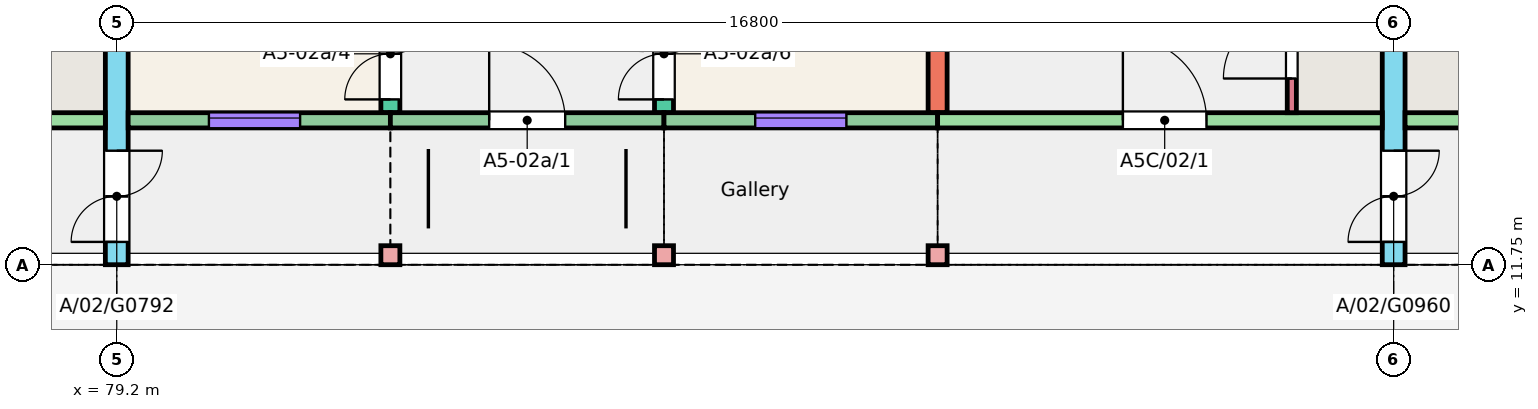
"""IFC4 building model, lengths in metres.
Left out: names, types, materials, properties, quantities, classifications, styles, units other than length and angle.
Written with IfcOpenShell. Run it as: python <this file> out.ifc"""

import sys

from ifc_helpers import new_model, si_unit, direction, frame, frame_2d, origin, origin_2d, place, context, subcontext, project, spatial, rectangle, extrude, element, fill, save


model = new_model("IFC4")
c1 = context("Model", 3, precision=1e-05, world=origin(), true_north=direction((0.0, 1.0)))
c2 = subcontext(c1, "Body", "Model", "MODEL_VIEW")
j1 = project(units=[si_unit("LENGTHUNIT", "METRE"), si_unit("PLANEANGLEUNIT", "RADIAN")], contexts=[c1])
p1 = place(None, origin())
s1 = spatial("IfcSite", under=j1, at=p1, CompositionType="ELEMENT")
p2 = place(p1, origin())
s2 = spatial("IfcBuilding", under=s1, at=p2, CompositionType="ELEMENT")
p3 = place(p2, frame((0.0, 0.0, 6.0)))
s3 = spatial("IfcBuildingStorey", under=s2, at=p3, CompositionType="ELEMENT", Elevation=6.0)
p4 = place(p3, frame((79.2, 11.75, 0.0), z_axis=(0.0, 0.0, 1.0), x_axis=(0.0, 1.0, 0.0)))
e1 = element("IfcWall", 1, at=p4, inside=s3, PredefinedType="SHEAR", context=c2, shape_type="SweptSolid", body=[
    extrude(rectangle(XDim=11.0, YDim=0.3, at=frame_2d((5.5, 0.0))), origin(), (0.0, 0.0, 1.0), 3.0),
])
p5 = place(p4, frame((0.3, 0.0, 0.0)))
e2 = element("IfcOpeningElement", 2, at=p5, cuts=e1, PredefinedType="OPENING", context=c2, shape_type="SweptSolid", body=[
    extrude(rectangle(XDim=1.2, YDim=2.1, at=frame_2d((0.6, 1.05))), frame((0.0, 0.16, 0.0), z_axis=(0.0, -1.0, 0.0), x_axis=(1.0, 0.0, 0.0)), (0.0, 0.0, 1.0), 0.32),
])
p6 = place(p3, frame((82.8, 13.75, 0.0), z_axis=(0.0, 0.0, 1.0), x_axis=(0.0, 1.0, 0.0)))
e3 = element("IfcWall", 3, at=p6, inside=s3, PredefinedType="SHEAR", context=c2, shape_type="SweptSolid", body=[
    extrude(rectangle(XDim=9.0, YDim=0.25, at=frame_2d((4.5, 0.0))), origin(), (0.0, 0.0, 1.0), 3.0),
])
p7 = place(p6, frame((0.175, 0.0, 0.0)))
e4 = element("IfcOpeningElement", 4, at=p7, cuts=e3, PredefinedType="OPENING", context=c2, shape_type="SweptSolid", body=[
    extrude(rectangle(XDim=1.2, YDim=2.1, at=frame_2d((0.6, 1.05))), frame((0.0, 0.135, 0.0), z_axis=(0.0, -1.0, 0.0), x_axis=(1.0, 0.0, 0.0)), (0.0, 0.0, 1.0), 0.27),
])
p8 = place(p6, frame((6.4, 0.0, 0.0)))
e5 = element("IfcOpeningElement", 5, at=p8, cuts=e3, PredefinedType="OPENING", context=c2, shape_type="SweptSolid", body=[
    extrude(rectangle(XDim=1.2, YDim=2.1, at=frame_2d((0.6, 1.05))), frame((0.0, 0.135, 0.0), z_axis=(0.0, -1.0, 0.0), x_axis=(1.0, 0.0, 0.0)), (0.0, 0.0, 1.0), 0.27),
])
p9 = place(p3, frame((86.4, 13.75, 0.0), z_axis=(0.0, 0.0, 1.0), x_axis=(0.0, 1.0, 0.0)))
e6 = element("IfcWall", 6, at=p9, inside=s3, PredefinedType="SHEAR", context=c2, shape_type="SweptSolid", body=[
    extrude(rectangle(XDim=9.0, YDim=0.25, at=frame_2d((4.5, 0.0))), origin(), (0.0, 0.0, 1.0), 3.0),
])
p10 = place(p9, frame((0.175, 0.0, 0.0)))
e7 = element("IfcOpeningElement", 7, at=p10, cuts=e6, PredefinedType="OPENING", context=c2, shape_type="SweptSolid", body=[
    extrude(rectangle(XDim=1.2, YDim=2.1, at=frame_2d((0.6, 1.05))), frame((0.0, 0.135, 0.0), z_axis=(0.0, -1.0, 0.0), x_axis=(1.0, 0.0, 0.0)), (0.0, 0.0, 1.0), 0.27),
])
p11 = place(p9, frame((6.4, 0.0, 0.0)))
e8 = element("IfcOpeningElement", 8, at=p11, cuts=e6, PredefinedType="OPENING", context=c2, shape_type="SweptSolid", body=[
    extrude(rectangle(XDim=1.2, YDim=2.1, at=frame_2d((0.6, 1.05))), frame((0.0, 0.135, 0.0), z_axis=(0.0, -1.0, 0.0), x_axis=(1.0, 0.0, 0.0)), (0.0, 0.0, 1.0), 0.27),
])
p12 = place(p3, frame((90.0, 13.75, 0.0), z_axis=(0.0, 0.0, 1.0), x_axis=(0.0, 1.0, 0.0)))
e9 = element("IfcWall", 9, at=p12, inside=s3, PredefinedType="SHEAR", context=c2, shape_type="SweptSolid", body=[
    extrude(rectangle(XDim=9.0, YDim=0.25, at=frame_2d((4.5, 0.0))), origin(), (0.0, 0.0, 1.0), 3.0),
])
p13 = place(p3, frame((96.0, 11.75, 0.0), z_axis=(0.0, 0.0, 1.0), x_axis=(0.0, 1.0, 0.0)))
e10 = element("IfcWall", 10, at=p13, inside=s3, PredefinedType="SHEAR", context=c2, shape_type="SweptSolid", body=[
    extrude(rectangle(XDim=11.0, YDim=0.3, at=frame_2d((5.5, 0.0))), origin(), (0.0, 0.0, 1.0), 3.0),
])
p14 = place(p13, frame((0.3, 0.0, 0.0)))
e11 = element("IfcOpeningElement", 11, at=p14, cuts=e10, PredefinedType="OPENING", context=c2, shape_type="SweptSolid", body=[
    extrude(rectangle(XDim=1.2, YDim=2.1, at=frame_2d((0.6, 1.05))), frame((0.0, 0.16, 0.0), z_axis=(0.0, -1.0, 0.0), x_axis=(1.0, 0.0, 0.0)), (0.0, 0.0, 1.0), 0.32),
])
p15 = place(p3, frame((73.2, 13.65, 0.0), z_axis=(0.0, 0.0, 1.0), x_axis=(1.0, 0.0, 0.0)))
e12 = element("IfcWall", 12, at=p15, inside=s3, PredefinedType="SHEAR", context=c2, shape_type="SweptSolid", body=[
    extrude(rectangle(XDim=5.85, YDim=0.2, at=frame_2d((2.925, 0.0))), origin(), (0.0, 0.0, 1.0), 3.0),
])
p16 = place(p15, frame((2.438, 0.0, 0.0)))
e13 = element("IfcOpeningElement", 13, at=p16, cuts=e12, PredefinedType="OPENING", context=c2, shape_type="SweptSolid", body=[
    extrude(rectangle(XDim=1.1, YDim=2.1, at=frame_2d((0.55, 1.05))), frame((0.0, 0.11, 0.0), z_axis=(0.0, -1.0, 0.0), x_axis=(1.0, 0.0, 0.0)), (0.0, 0.0, 1.0), 0.22),
])
p17 = place(p3, frame((79.35, 13.65, 0.0), z_axis=(0.0, 0.0, 1.0), x_axis=(1.0, 0.0, 0.0)))
e14 = element("IfcWall", 14, at=p17, inside=s3, PredefinedType="SOLIDWALL", context=c2, shape_type="SweptSolid", body=[
    extrude(rectangle(XDim=3.45, YDim=0.2, at=frame_2d((1.725, 0.0))), origin(), (0.0, 0.0, 1.0), 3.0),
])
p18 = place(p17, frame((1.062, 0.0, 0.8)))
e15 = element("IfcOpeningElement", 15, at=p18, cuts=e14, PredefinedType="OPENING", context=c2, shape_type="SweptSolid", body=[
    extrude(rectangle(XDim=1.2, YDim=1.6, at=frame_2d((0.6, 0.8))), frame((0.0, 0.11, 0.0), z_axis=(0.0, -1.0, 0.0), x_axis=(1.0, 0.0, 0.0)), (0.0, 0.0, 1.0), 0.22),
])
p19 = place(p3, frame((82.8, 13.65, 0.0), z_axis=(0.0, 0.0, 1.0), x_axis=(1.0, 0.0, 0.0)))
e16 = element("IfcWall", 16, at=p19, inside=s3, PredefinedType="SOLIDWALL", context=c2, shape_type="SweptSolid", body=[
    extrude(rectangle(XDim=3.6, YDim=0.2, at=frame_2d((1.8, 0.0))), origin(), (0.0, 0.0, 1.0), 3.0),
])
p20 = place(p19, frame((1.3, 0.0, 0.0)))
e17 = element("IfcOpeningElement", 17, at=p20, cuts=e16, PredefinedType="OPENING", context=c2, shape_type="SweptSolid", body=[
    extrude(rectangle(XDim=1.0, YDim=2.1, at=frame_2d((0.5, 1.05))), frame((0.0, 0.11, 0.0), z_axis=(0.0, -1.0, 0.0), x_axis=(1.0, 0.0, 0.0)), (0.0, 0.0, 1.0), 0.22),
])
p21 = place(p3, frame((86.4, 13.65, 0.0), z_axis=(0.0, 0.0, 1.0), x_axis=(1.0, 0.0, 0.0)))
e18 = element("IfcWall", 18, at=p21, inside=s3, PredefinedType="SOLIDWALL", context=c2, shape_type="SweptSolid", body=[
    extrude(rectangle(XDim=3.6, YDim=0.2, at=frame_2d((1.8, 0.0))), origin(), (0.0, 0.0, 1.0), 3.0),
])
p22 = place(p21, frame((1.2, 0.0, 0.8)))
e19 = element("IfcOpeningElement", 19, at=p22, cuts=e18, PredefinedType="OPENING", context=c2, shape_type="SweptSolid", body=[
    extrude(rectangle(XDim=1.2, YDim=1.6, at=frame_2d((0.6, 0.8))), frame((0.0, 0.11, 0.0), z_axis=(0.0, -1.0, 0.0), x_axis=(1.0, 0.0, 0.0)), (0.0, 0.0, 1.0), 0.22),
])
p23 = place(p3, frame((90.0, 13.65, 0.0), z_axis=(0.0, 0.0, 1.0), x_axis=(1.0, 0.0, 0.0)))
e20 = element("IfcWall", 20, at=p23, inside=s3, PredefinedType="SHEAR", context=c2, shape_type="SweptSolid", body=[
    extrude(rectangle(XDim=5.85, YDim=0.2, at=frame_2d((2.925, 0.0))), origin(), (0.0, 0.0, 1.0), 3.0),
])
p24 = place(p23, frame((2.438, 0.0, 0.0)))
e21 = element("IfcOpeningElement", 21, at=p24, cuts=e20, PredefinedType="OPENING", context=c2, shape_type="SweptSolid", body=[
    extrude(rectangle(XDim=1.1, YDim=2.1, at=frame_2d((0.55, 1.05))), frame((0.0, 0.11, 0.0), z_axis=(0.0, -1.0, 0.0), x_axis=(1.0, 0.0, 0.0)), (0.0, 0.0, 1.0), 0.22),
])
p25 = place(p3, frame((94.66, 13.75, 0.0), z_axis=(0.0, 0.0, 1.0), x_axis=(0.0, 1.0, 0.0)))
e22 = element("IfcWall", 22, at=p25, inside=s3, PredefinedType="SHEAR", context=c2, shape_type="SweptSolid", body=[
    extrude(rectangle(XDim=1.72, YDim=0.12, at=frame_2d((0.86, 0.0))), origin(), (0.0, 0.0, 1.0), 3.0),
])
p26 = place(p25, frame((0.45, 0.0, 0.0)))
e23 = element("IfcOpeningElement", 23, at=p26, cuts=e22, PredefinedType="OPENING", context=c2, shape_type="SweptSolid", body=[
    extrude(rectangle(XDim=0.9, YDim=2.1, at=frame_2d((0.45, 1.05))), frame((0.0, 0.07, 0.0), z_axis=(0.0, -1.0, 0.0), x_axis=(1.0, 0.0, 0.0)), (0.0, 0.0, 1.0), 0.14),
])
p27 = place(p3, frame((96.15, 13.65, 0.0), z_axis=(0.0, 0.0, 1.0), x_axis=(1.0, 0.0, 0.0)))
e24 = element("IfcWall", 24, at=p27, inside=s3, PredefinedType="SHEAR", context=c2, shape_type="SweptSolid", body=[
    extrude(rectangle(XDim=5.85, YDim=0.2, at=frame_2d((2.925, 0.0))), origin(), (0.0, 0.0, 1.0), 3.0),
])
p28 = place(p27, frame((2.312, 0.0, 0.0)))
e25 = element("IfcOpeningElement", 25, at=p28, cuts=e24, PredefinedType="OPENING", context=c2, shape_type="SweptSolid", body=[
    extrude(rectangle(XDim=1.1, YDim=2.1, at=frame_2d((0.55, 1.05))), frame((0.0, 0.11, 0.0), z_axis=(0.0, -1.0, 0.0), x_axis=(1.0, 0.0, 0.0)), (0.0, 0.0, 1.0), 0.22),
])
for number, where, z_axis, x_axis in (
    (26, (82.8, 11.875, 0.0), (0.0, 0.0, 1.0), (1.0, 0.0, 0.0)),
    (27, (86.4, 11.875, 0.0), (0.0, 0.0, 1.0), (1.0, 0.0, 0.0)),
    (28, (90.0, 11.875, 0.0), (0.0, 0.0, 1.0), (1.0, 0.0, 0.0)),
):
    element("IfcColumn", number, at=place(p3, frame(where, z_axis=z_axis, x_axis=x_axis)), inside=s3, PredefinedType="COLUMN", context=c2, shape_type="SweptSolid", body=[
        extrude(rectangle(XDim=0.25, YDim=0.25, at=origin_2d()), origin(), (0.0, 0.0, 1.0), 3.0),
    ])
p29 = place(p18, origin())
e29 = element("IfcWindow", 29, at=p29, inside=s3, PartitioningType="SINGLE_PANEL", PredefinedType="WINDOW", context=c2, shape_type="SweptSolid", body=[
    extrude(rectangle(XDim=1.2, YDim=1.6, at=frame_2d((0.6, 0.8))), frame((0.0, 0.06, 0.0), z_axis=(0.0, -1.0, 0.0), x_axis=(1.0, 0.0, 0.0)), (0.0, 0.0, 1.0), 0.06),
])
fill(e15, e29)
p30 = place(p22, origin())
e30 = element("IfcWindow", 30, at=p30, inside=s3, PartitioningType="SINGLE_PANEL", PredefinedType="WINDOW", context=c2, shape_type="SweptSolid", body=[
    extrude(rectangle(XDim=1.2, YDim=1.6, at=frame_2d((0.6, 0.8))), frame((0.0, 0.06, 0.0), z_axis=(0.0, -1.0, 0.0), x_axis=(1.0, 0.0, 0.0)), (0.0, 0.0, 1.0), 0.06),
])
fill(e19, e30)
p31 = place(p20, origin())
e31 = element("IfcDoor", 31, at=p31, inside=s3, OperationType="SINGLE_SWING_LEFT", PredefinedType="DOOR", context=c2, shape_type="SweptSolid", body=[
    extrude(rectangle(XDim=1.0, YDim=2.1, at=frame_2d((0.5, 1.05))), frame((0.0, 0.025, 0.0), z_axis=(0.0, -1.0, 0.0), x_axis=(1.0, 0.0, 0.0)), (0.0, 0.0, 1.0), 0.05),
])
fill(e17, e31)
p32 = place(p7, origin())
e32 = element("IfcDoor", 32, at=p32, inside=s3, OperationType="DOUBLE_DOOR_SINGLE_SWING", PredefinedType="DOOR", context=c2, shape_type="SweptSolid", body=[
    extrude(rectangle(XDim=1.2, YDim=2.1, at=frame_2d((0.6, 1.05))), frame((0.0, 0.025, 0.0), z_axis=(0.0, -1.0, 0.0), x_axis=(1.0, 0.0, 0.0)), (0.0, 0.0, 1.0), 0.05),
])
fill(e4, e32)
p33 = place(p10, origin())
e33 = element("IfcDoor", 33, at=p33, inside=s3, OperationType="DOUBLE_DOOR_SINGLE_SWING", PredefinedType="DOOR", context=c2, shape_type="SweptSolid", body=[
    extrude(rectangle(XDim=1.2, YDim=2.1, at=frame_2d((0.6, 1.05))), frame((0.0, 0.025, 0.0), z_axis=(0.0, -1.0, 0.0), x_axis=(1.0, 0.0, 0.0)), (0.0, 0.0, 1.0), 0.05),
])
fill(e7, e33)
p34 = place(p24, origin())
e34 = element("IfcDoor", 34, at=p34, inside=s3, OperationType="SINGLE_SWING_LEFT", PredefinedType="DOOR", context=c2, shape_type="SweptSolid", body=[
    extrude(rectangle(XDim=1.1, YDim=2.1, at=frame_2d((0.55, 1.05))), frame((0.0, 0.025, 0.0), z_axis=(0.0, -1.0, 0.0), x_axis=(1.0, 0.0, 0.0)), (0.0, 0.0, 1.0), 0.05),
])
fill(e21, e34)
p35 = place(p26, origin())
e35 = element("IfcDoor", 35, at=p35, inside=s3, OperationType="SINGLE_SWING_LEFT", PredefinedType="DOOR", context=c2, shape_type="SweptSolid", body=[
    extrude(rectangle(XDim=0.9, YDim=2.1, at=frame_2d((0.45, 1.05))), frame((0.0, 0.025, 0.0), z_axis=(0.0, -1.0, 0.0), x_axis=(1.0, 0.0, 0.0)), (0.0, 0.0, 1.0), 0.05),
])
fill(e23, e35)
p36 = place(p5, origin())
e36 = element("IfcDoor", 36, at=p36, inside=s3, OperationType="DOUBLE_DOOR_SINGLE_SWING", PredefinedType="DOOR", context=c2, shape_type="SweptSolid", body=[
    extrude(rectangle(XDim=1.2, YDim=2.1, at=frame_2d((0.6, 1.05))), frame((0.0, 0.025, 0.0), z_axis=(0.0, -1.0, 0.0), x_axis=(1.0, 0.0, 0.0)), (0.0, 0.0, 1.0), 0.05),
])
fill(e2, e36)
p37 = place(p14, origin())
e37 = element("IfcDoor", 37, at=p37, inside=s3, OperationType="DOUBLE_DOOR_SINGLE_SWING", PredefinedType="DOOR", context=c2, shape_type="SweptSolid", body=[
    extrude(rectangle(XDim=1.2, YDim=2.1, at=frame_2d((0.6, 1.05))), frame((0.0, 0.025, 0.0), z_axis=(0.0, -1.0, 0.0), x_axis=(1.0, 0.0, 0.0)), (0.0, 0.0, 1.0), 0.05),
])
fill(e11, e37)
save(model, sys.argv[1])
